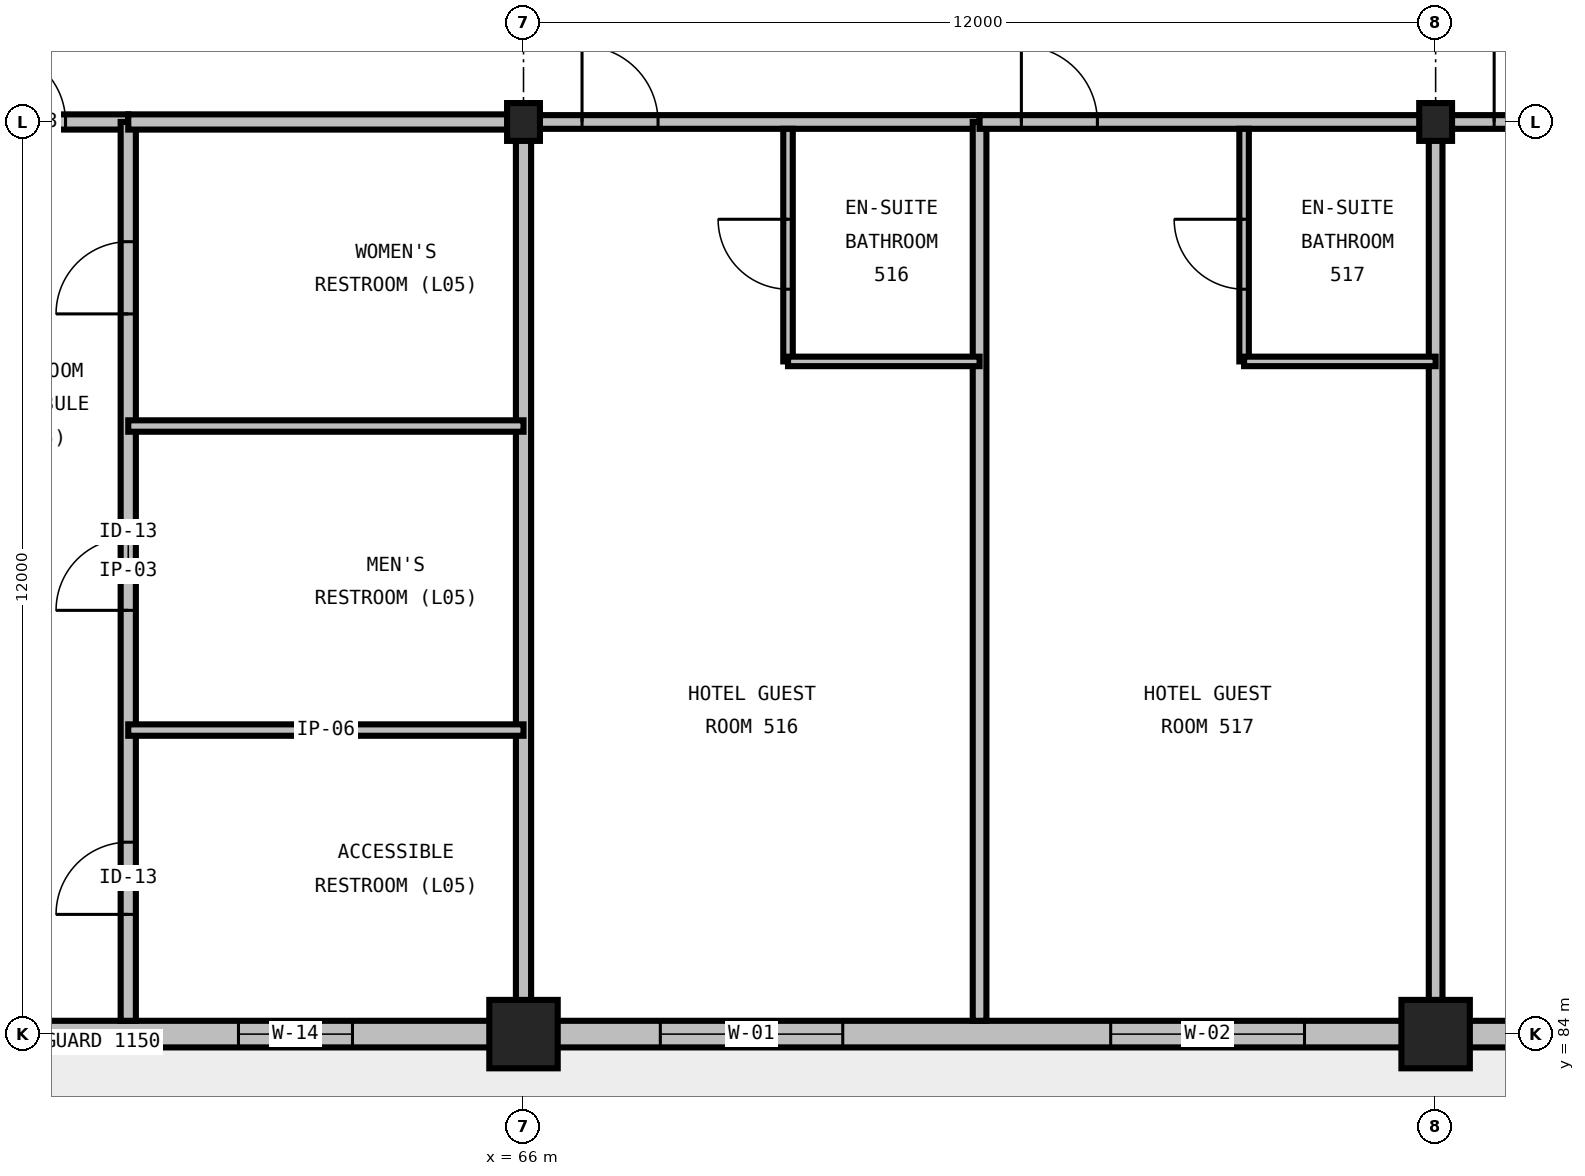
"""IFC4 building model, lengths in metres.
Left out: names, types, materials, properties, quantities, classifications, styles, units other than length and angle.
Written with IfcOpenShell. Run it as: python <this file> out.ifc"""

import sys

from ifc_helpers import new_model, si_unit, direction, frame, frame_2d, origin, origin_2d, place, context, subcontext, project, spatial, rectangle, i_section, extrude, element, fill, save


model = new_model("IFC4")
c1 = context("Model", 3, precision=1e-05, world=origin(), true_north=direction((0.0, 1.0)))
c2 = subcontext(c1, "Body", "Model", "MODEL_VIEW")
j1 = project(units=[si_unit("LENGTHUNIT", "METRE"), si_unit("PLANEANGLEUNIT", "RADIAN")], contexts=[c1])
p1 = place(None, origin())
s1 = spatial("IfcSite", under=j1, at=p1, CompositionType="ELEMENT")
p2 = place(p1, origin())
s2 = spatial("IfcBuilding", under=s1, at=p2, CompositionType="ELEMENT")
p3 = place(p2, frame((0.0, 0.0, 27.6)))
s3 = spatial("IfcBuildingStorey", under=s2, at=p3, CompositionType="ELEMENT", Elevation=27.6)
p4 = place(p3, frame((66.0, 84.0, 0.0), z_axis=(0.0, 0.0, 1.0), x_axis=(1.0, 0.0, 0.0)))
e1 = element("IfcColumn", 1, at=p4, inside=s3, PredefinedType="COLUMN", context=c2, shape_type="SweptSolid", body=[
    extrude(rectangle(XDim=0.9, YDim=0.9, at=origin_2d()), origin(), (0.0, 0.0, 1.0), 3.6),
])
p5 = place(p3, frame((66.0, 96.0, 0.0), z_axis=(0.0, 0.0, 1.0), x_axis=(1.0, 0.0, 0.0)))
e2 = element("IfcColumn", 2, at=p5, inside=s3, PredefinedType="COLUMN", context=c2, shape_type="SweptSolid", body=[
    extrude(i_section(OverallWidth=0.432, OverallDepth=0.498, WebThickness=0.056, FlangeThickness=0.089, FilletRadius=0.031, at=origin_2d()), origin(), (0.0, 0.0, 1.0), 3.6),
])
p6 = place(p3, frame((78.0, 84.0, 0.0), z_axis=(0.0, 0.0, 1.0), x_axis=(1.0, 0.0, 0.0)))
e3 = element("IfcColumn", 3, at=p6, inside=s3, PredefinedType="COLUMN", context=c2, shape_type="SweptSolid", body=[
    extrude(rectangle(XDim=0.9, YDim=0.9, at=origin_2d()), origin(), (0.0, 0.0, 1.0), 3.6),
])
p7 = place(p3, frame((78.0, 96.0, 0.0), z_axis=(0.0, 0.0, 1.0), x_axis=(1.0, 0.0, 0.0)))
e4 = element("IfcColumn", 4, at=p7, inside=s3, PredefinedType="COLUMN", context=c2, shape_type="SweptSolid", body=[
    extrude(i_section(OverallWidth=0.432, OverallDepth=0.498, WebThickness=0.056, FlangeThickness=0.089, FilletRadius=0.031, at=origin_2d()), origin(), (0.0, 0.0, 1.0), 3.6),
])
p8 = place(p3, frame((54.0, 84.0, 0.0), z_axis=(0.0, 0.0, 1.0), x_axis=(1.0, 0.0, 0.0)))
e5 = element("IfcWall", 5, at=p8, inside=s3, PredefinedType="STANDARD", context=c2, shape_type="SweptSolid", body=[
    extrude(rectangle(XDim=12.0, YDim=0.35, at=frame_2d((6.0, 0.0))), origin(), (0.0, 0.0, 1.0), 2.486),
])
p9 = place(p8, frame((2.3, 0.0, 1.0)))
e6 = element("IfcOpeningElement", 6, at=p9, cuts=e5, PredefinedType="OPENING", context=c2, shape_type="SweptSolid", body=[
    extrude(rectangle(XDim=1.4, YDim=1.4, at=frame_2d((0.7, 0.7))), frame((0.0, 0.19, 0.0), z_axis=(0.0, -1.0, 0.0), x_axis=(1.0, 0.0, 0.0)), (0.0, 0.0, 1.0), 0.38),
])
p10 = place(p8, frame((8.25, 0.0, 1.0)))
e7 = element("IfcOpeningElement", 7, at=p10, cuts=e5, PredefinedType="OPENING", context=c2, shape_type="SweptSolid", body=[
    extrude(rectangle(XDim=1.5, YDim=1.35, at=frame_2d((0.75, 0.675))), frame((0.0, 0.19, 0.0), z_axis=(0.0, -1.0, 0.0), x_axis=(1.0, 0.0, 0.0)), (0.0, 0.0, 1.0), 0.38),
])
p11 = place(p3, frame((66.0, 84.0, 0.0), z_axis=(0.0, 0.0, 1.0), x_axis=(1.0, 0.0, 0.0)))
e8 = element("IfcWall", 8, at=p11, inside=s3, PredefinedType="STANDARD", context=c2, shape_type="SweptSolid", body=[
    extrude(rectangle(XDim=12.0, YDim=0.35, at=frame_2d((6.0, 0.0))), origin(), (0.0, 0.0, 1.0), 2.486),
])
p12 = place(p11, frame((1.8, 0.0, 0.75)))
e9 = element("IfcOpeningElement", 9, at=p12, cuts=e8, PredefinedType="OPENING", context=c2, shape_type="SweptSolid", body=[
    extrude(rectangle(XDim=2.4, YDim=1.65, at=frame_2d((1.2, 0.825))), frame((0.0, 0.19, 0.0), z_axis=(0.0, -1.0, 0.0), x_axis=(1.0, 0.0, 0.0)), (0.0, 0.0, 1.0), 0.38),
])
p13 = place(p11, frame((7.725, 0.0, 0.75)))
e10 = element("IfcOpeningElement", 10, at=p13, cuts=e8, PredefinedType="OPENING", context=c2, shape_type="SweptSolid", body=[
    extrude(rectangle(XDim=2.55, YDim=1.65, at=frame_2d((1.275, 0.825))), frame((0.0, 0.19, 0.0), z_axis=(0.0, -1.0, 0.0), x_axis=(1.0, 0.0, 0.0)), (0.0, 0.0, 1.0), 0.38),
])
p14 = place(p3, frame((78.0, 84.0, 0.0), z_axis=(0.0, 0.0, 1.0), x_axis=(1.0, 0.0, 0.0)))
e11 = element("IfcWall", 11, at=p14, inside=s3, PredefinedType="STANDARD", context=c2, shape_type="SweptSolid", body=[
    extrude(rectangle(XDim=6.0, YDim=0.35, at=frame_2d((3.0, 0.0))), origin(), (0.0, 0.0, 1.0), 2.486),
])
p15 = place(p14, frame((1.8, 0.0, 0.75)))
e12 = element("IfcOpeningElement", 12, at=p15, cuts=e11, PredefinedType="OPENING", context=c2, shape_type="SweptSolid", body=[
    extrude(rectangle(XDim=2.4, YDim=1.65, at=frame_2d((1.2, 0.825))), frame((0.0, 0.19, 0.0), z_axis=(0.0, -1.0, 0.0), x_axis=(1.0, 0.0, 0.0)), (0.0, 0.0, 1.0), 0.38),
])
p16 = place(p3, frame((58.4, 96.0, 0.0), z_axis=(0.0, 0.0, 1.0), x_axis=(1.0, 0.0, 0.0)))
e13 = element("IfcWall", 13, at=p16, inside=s3, PredefinedType="PARTITIONING", context=c2, shape_type="SweptSolid", body=[
    extrude(rectangle(XDim=2.4, YDim=0.2, at=frame_2d((1.2, 0.0))), origin(), (0.0, 0.0, 1.0), 2.359),
])
p17 = place(p16, frame((0.625, 0.0, 0.0)))
e14 = element("IfcOpeningElement", 14, at=p17, cuts=e13, PredefinedType="OPENING", context=c2, shape_type="SweptSolid", body=[
    extrude(rectangle(XDim=0.95, YDim=2.15, at=frame_2d((0.475, 1.075))), frame((0.0, 0.115, 0.0), z_axis=(0.0, -1.0, 0.0), x_axis=(1.0, 0.0, 0.0)), (0.0, 0.0, 1.0), 0.23),
])
p18 = place(p3, frame((60.8, 84.175, 0.0), z_axis=(0.0, 0.0, 1.0), x_axis=(0.0, 1.0, 0.0)))
e15 = element("IfcWall", 15, at=p18, inside=s3, PredefinedType="PARTITIONING", context=c2, shape_type="SweptSolid", body=[
    extrude(rectangle(XDim=11.825, YDim=0.2, at=frame_2d((5.913, 0.0))), origin(), (0.0, 0.0, 1.0), 3.29),
])
p19 = place(p18, frame((1.4, 0.0, 0.0)))
e16 = element("IfcOpeningElement", 16, at=p19, cuts=e15, PredefinedType="OPENING", context=c2, shape_type="SweptSolid", body=[
    extrude(rectangle(XDim=0.95, YDim=2.15, at=frame_2d((0.475, 1.075))), frame((0.0, 0.115, 0.0), z_axis=(0.0, -1.0, 0.0), x_axis=(1.0, 0.0, 0.0)), (0.0, 0.0, 1.0), 0.23),
])
p20 = place(p18, frame((5.4, 0.0, 0.0)))
e17 = element("IfcOpeningElement", 17, at=p20, cuts=e15, PredefinedType="OPENING", context=c2, shape_type="SweptSolid", body=[
    extrude(rectangle(XDim=0.95, YDim=2.15, at=frame_2d((0.475, 1.075))), frame((0.0, 0.115, 0.0), z_axis=(0.0, -1.0, 0.0), x_axis=(1.0, 0.0, 0.0)), (0.0, 0.0, 1.0), 0.23),
])
p21 = place(p18, frame((9.3, 0.0, 0.0)))
e18 = element("IfcOpeningElement", 18, at=p21, cuts=e15, PredefinedType="OPENING", context=c2, shape_type="SweptSolid", body=[
    extrude(rectangle(XDim=0.95, YDim=2.15, at=frame_2d((0.475, 1.075))), frame((0.0, 0.115, 0.0), z_axis=(0.0, -1.0, 0.0), x_axis=(1.0, 0.0, 0.0)), (0.0, 0.0, 1.0), 0.23),
])
p22 = place(p3, frame((66.0, 84.175, 0.0), z_axis=(0.0, 0.0, 1.0), x_axis=(0.0, 1.0, 0.0)))
e19 = element("IfcWall", 19, at=p22, inside=s3, PredefinedType="PARTITIONING", context=c2, shape_type="SweptSolid", body=[
    extrude(rectangle(XDim=11.825, YDim=0.2, at=frame_2d((5.913, 0.0))), origin(), (0.0, 0.0, 1.0), 2.59),
])
p23 = place(p3, frame((60.8, 96.0, 0.0), z_axis=(0.0, 0.0, 1.0), x_axis=(1.0, 0.0, 0.0)))
e20 = element("IfcWall", 20, at=p23, inside=s3, PredefinedType="PARTITIONING", context=c2, shape_type="SweptSolid", body=[
    extrude(rectangle(XDim=5.2, YDim=0.2, at=frame_2d((2.6, 0.0))), origin(), (0.0, 0.0, 1.0), 2.359),
])
for number, where, z_axis, x_axis in (
    (21, (60.8, 88.0, 0.0), (0.0, 0.0, 1.0), (1.0, 0.0, 0.0)),
    (22, (60.8, 92.0, 0.0), (0.0, 0.0, 1.0), (1.0, 0.0, 0.0)),
):
    element("IfcWall", number, at=place(p3, frame(where, z_axis=z_axis, x_axis=x_axis)), inside=s3, PredefinedType="PARTITIONING", context=c2, shape_type="SweptSolid", body=[
        extrude(rectangle(XDim=5.2, YDim=0.15, at=frame_2d((2.6, 0.0))), origin(), (0.0, 0.0, 1.0), 3.29),
    ])
p24 = place(p3, frame((66.0, 96.0, 0.0), z_axis=(0.0, 0.0, 1.0), x_axis=(1.0, 0.0, 0.0)))
e23 = element("IfcWall", 23, at=p24, inside=s3, PredefinedType="PARTITIONING", context=c2, shape_type="SweptSolid", body=[
    extrude(rectangle(XDim=6.0, YDim=0.18, at=frame_2d((3.0, 0.0))), origin(), (0.0, 0.0, 1.0), 2.664),
])
p25 = place(p24, frame((0.77, 0.0, 0.0)))
e24 = element("IfcOpeningElement", 24, at=p25, cuts=e23, PredefinedType="OPENING", context=c2, shape_type="SweptSolid", body=[
    extrude(rectangle(XDim=1.0, YDim=2.15, at=frame_2d((0.5, 1.075))), frame((0.0, 0.105, 0.0), z_axis=(0.0, -1.0, 0.0), x_axis=(1.0, 0.0, 0.0)), (0.0, 0.0, 1.0), 0.21),
])
p26 = place(p3, frame((72.0, 84.175, 0.0), z_axis=(0.0, 0.0, 1.0), x_axis=(0.0, 1.0, 0.0)))
e25 = element("IfcWall", 25, at=p26, inside=s3, PredefinedType="PARTITIONING", context=c2, shape_type="SweptSolid", body=[
    extrude(rectangle(XDim=11.825, YDim=0.18, at=frame_2d((5.913, 0.0))), origin(), (0.0, 0.0, 1.0), 3.29),
])
p27 = place(p3, frame((69.48, 92.85, 0.0), z_axis=(0.0, 0.0, 1.0), x_axis=(0.0, 1.0, 0.0)))
e26 = element("IfcWall", 26, at=p27, inside=s3, PredefinedType="PARTITIONING", context=c2, shape_type="SweptSolid", body=[
    extrude(rectangle(XDim=3.06, YDim=0.125, at=frame_2d((1.53, 0.0))), origin(), (0.0, 0.0, 1.0), 3.29),
])
p28 = place(p27, frame((0.95, 0.0, 0.0)))
e27 = element("IfcOpeningElement", 27, at=p28, cuts=e26, PredefinedType="OPENING", context=c2, shape_type="SweptSolid", body=[
    extrude(rectangle(XDim=0.92, YDim=2.1, at=frame_2d((0.46, 1.05))), frame((0.0, 0.077, 0.0), z_axis=(0.0, -1.0, 0.0), x_axis=(1.0, 0.0, 0.0)), (0.0, 0.0, 1.0), 0.155),
])
p29 = place(p3, frame((69.48, 92.85, 0.0), z_axis=(0.0, 0.0, 1.0), x_axis=(1.0, 0.0, 0.0)))
e28 = element("IfcWall", 28, at=p29, inside=s3, PredefinedType="PARTITIONING", context=c2, shape_type="SweptSolid", body=[
    extrude(rectangle(XDim=2.52, YDim=0.125, at=frame_2d((1.26, 0.0))), origin(), (0.0, 0.0, 1.0), 3.29),
])
p30 = place(p3, frame((72.0, 96.0, 0.0), z_axis=(0.0, 0.0, 1.0), x_axis=(1.0, 0.0, 0.0)))
e29 = element("IfcWall", 29, at=p30, inside=s3, PredefinedType="PARTITIONING", context=c2, shape_type="SweptSolid", body=[
    extrude(rectangle(XDim=6.0, YDim=0.18, at=frame_2d((3.0, 0.0))), origin(), (0.0, 0.0, 1.0), 2.664),
])
p31 = place(p30, frame((0.55, 0.0, 0.0)))
e30 = element("IfcOpeningElement", 30, at=p31, cuts=e29, PredefinedType="OPENING", context=c2, shape_type="SweptSolid", body=[
    extrude(rectangle(XDim=1.0, YDim=2.15, at=frame_2d((0.5, 1.075))), frame((0.0, 0.105, 0.0), z_axis=(0.0, -1.0, 0.0), x_axis=(1.0, 0.0, 0.0)), (0.0, 0.0, 1.0), 0.21),
])
p32 = place(p3, frame((78.0, 84.175, 0.0), z_axis=(0.0, 0.0, 1.0), x_axis=(0.0, 1.0, 0.0)))
e31 = element("IfcWall", 31, at=p32, inside=s3, PredefinedType="PARTITIONING", context=c2, shape_type="SweptSolid", body=[
    extrude(rectangle(XDim=11.825, YDim=0.18, at=frame_2d((5.913, 0.0))), origin(), (0.0, 0.0, 1.0), 2.59),
])
p33 = place(p3, frame((75.48, 92.85, 0.0), z_axis=(0.0, 0.0, 1.0), x_axis=(0.0, 1.0, 0.0)))
e32 = element("IfcWall", 32, at=p33, inside=s3, PredefinedType="PARTITIONING", context=c2, shape_type="SweptSolid", body=[
    extrude(rectangle(XDim=3.06, YDim=0.125, at=frame_2d((1.53, 0.0))), origin(), (0.0, 0.0, 1.0), 3.29),
])
p34 = place(p33, frame((0.95, 0.0, 0.0)))
e33 = element("IfcOpeningElement", 33, at=p34, cuts=e32, PredefinedType="OPENING", context=c2, shape_type="SweptSolid", body=[
    extrude(rectangle(XDim=0.92, YDim=2.1, at=frame_2d((0.46, 1.05))), frame((0.0, 0.077, 0.0), z_axis=(0.0, -1.0, 0.0), x_axis=(1.0, 0.0, 0.0)), (0.0, 0.0, 1.0), 0.155),
])
p35 = place(p3, frame((75.48, 92.85, 0.0), z_axis=(0.0, 0.0, 1.0), x_axis=(1.0, 0.0, 0.0)))
e34 = element("IfcWall", 34, at=p35, inside=s3, PredefinedType="PARTITIONING", context=c2, shape_type="SweptSolid", body=[
    extrude(rectangle(XDim=2.52, YDim=0.125, at=frame_2d((1.26, 0.0))), origin(), (0.0, 0.0, 1.0), 3.29),
])
p36 = place(p3, frame((78.0, 96.0, 0.0), z_axis=(0.0, 0.0, 1.0), x_axis=(1.0, 0.0, 0.0)))
e35 = element("IfcWall", 35, at=p36, inside=s3, PredefinedType="PARTITIONING", context=c2, shape_type="SweptSolid", body=[
    extrude(rectangle(XDim=6.0, YDim=0.18, at=frame_2d((3.0, 0.0))), origin(), (0.0, 0.0, 1.0), 2.736),
])
p37 = place(p36, frame((0.77, 0.0, 0.0)))
e36 = element("IfcOpeningElement", 36, at=p37, cuts=e35, PredefinedType="OPENING", context=c2, shape_type="SweptSolid", body=[
    extrude(rectangle(XDim=1.0, YDim=2.15, at=frame_2d((0.5, 1.075))), frame((0.0, 0.105, 0.0), z_axis=(0.0, -1.0, 0.0), x_axis=(1.0, 0.0, 0.0)), (0.0, 0.0, 1.0), 0.21),
])
p38 = place(p10, origin())
e37 = element("IfcWindow", 37, at=p38, inside=s3, PartitioningType="SINGLE_PANEL", PredefinedType="WINDOW", context=c2, shape_type="SweptSolid", body=[
    extrude(rectangle(XDim=1.5, YDim=1.35, at=frame_2d((0.75, 0.675))), frame((0.0, 0.03, 0.0), z_axis=(0.0, -1.0, 0.0), x_axis=(1.0, 0.0, 0.0)), (0.0, 0.0, 1.0), 0.06),
])
fill(e7, e37)
p39 = place(p12, origin())
e38 = element("IfcWindow", 38, at=p39, inside=s3, PartitioningType="DOUBLE_PANEL_VERTICAL", PredefinedType="WINDOW", context=c2, shape_type="SweptSolid", body=[
    extrude(rectangle(XDim=2.4, YDim=1.65, at=frame_2d((1.2, 0.825))), frame((0.0, 0.03, 0.0), z_axis=(0.0, -1.0, 0.0), x_axis=(1.0, 0.0, 0.0)), (0.0, 0.0, 1.0), 0.06),
])
fill(e9, e38)
p40 = place(p13, origin())
e39 = element("IfcWindow", 39, at=p40, inside=s3, PartitioningType="DOUBLE_PANEL_VERTICAL", PredefinedType="WINDOW", context=c2, shape_type="SweptSolid", body=[
    extrude(rectangle(XDim=2.55, YDim=1.65, at=frame_2d((1.275, 0.825))), frame((0.0, 0.03, 0.0), z_axis=(0.0, -1.0, 0.0), x_axis=(1.0, 0.0, 0.0)), (0.0, 0.0, 1.0), 0.06),
])
fill(e10, e39)
p41 = place(p17, origin())
e40 = element("IfcDoor", 40, at=p41, inside=s3, OperationType="SINGLE_SWING_LEFT", PredefinedType="DOOR", context=c2, shape_type="SweptSolid", body=[
    extrude(rectangle(XDim=0.95, YDim=2.15, at=frame_2d((0.475, 1.075))), frame((0.0, 0.025, 0.0), z_axis=(0.0, -1.0, 0.0), x_axis=(1.0, 0.0, 0.0)), (0.0, 0.0, 1.0), 0.05),
])
fill(e14, e40)
p42 = place(p19, origin())
e41 = element("IfcDoor", 41, at=p42, inside=s3, OperationType="SINGLE_SWING_LEFT", PredefinedType="DOOR", context=c2, shape_type="SweptSolid", body=[
    extrude(rectangle(XDim=0.95, YDim=2.15, at=frame_2d((0.475, 1.075))), frame((0.0, 0.025, 0.0), z_axis=(0.0, -1.0, 0.0), x_axis=(1.0, 0.0, 0.0)), (0.0, 0.0, 1.0), 0.05),
])
fill(e16, e41)
p43 = place(p20, origin())
e42 = element("IfcDoor", 42, at=p43, inside=s3, OperationType="SINGLE_SWING_LEFT", PredefinedType="DOOR", context=c2, shape_type="SweptSolid", body=[
    extrude(rectangle(XDim=0.95, YDim=2.15, at=frame_2d((0.475, 1.075))), frame((0.0, 0.025, 0.0), z_axis=(0.0, -1.0, 0.0), x_axis=(1.0, 0.0, 0.0)), (0.0, 0.0, 1.0), 0.05),
])
fill(e17, e42)
p44 = place(p21, origin())
e43 = element("IfcDoor", 43, at=p44, inside=s3, OperationType="SINGLE_SWING_LEFT", PredefinedType="DOOR", context=c2, shape_type="SweptSolid", body=[
    extrude(rectangle(XDim=0.95, YDim=2.15, at=frame_2d((0.475, 1.075))), frame((0.0, 0.025, 0.0), z_axis=(0.0, -1.0, 0.0), x_axis=(1.0, 0.0, 0.0)), (0.0, 0.0, 1.0), 0.05),
])
fill(e18, e43)
p45 = place(p25, origin())
e44 = element("IfcDoor", 44, at=p45, inside=s3, OperationType="SINGLE_SWING_LEFT", PredefinedType="DOOR", context=c2, shape_type="SweptSolid", body=[
    extrude(rectangle(XDim=1.0, YDim=2.15, at=frame_2d((0.5, 1.075))), frame((0.0, 0.025, 0.0), z_axis=(0.0, -1.0, 0.0), x_axis=(1.0, 0.0, 0.0)), (0.0, 0.0, 1.0), 0.05),
])
fill(e24, e44)
p46 = place(p28, origin())
e45 = element("IfcDoor", 45, at=p46, inside=s3, OperationType="SINGLE_SWING_RIGHT", PredefinedType="DOOR", context=c2, shape_type="SweptSolid", body=[
    extrude(rectangle(XDim=0.92, YDim=2.1, at=frame_2d((0.46, 1.05))), frame((0.0, 0.025, 0.0), z_axis=(0.0, -1.0, 0.0), x_axis=(1.0, 0.0, 0.0)), (0.0, 0.0, 1.0), 0.05),
])
fill(e27, e45)
p47 = place(p31, origin())
e46 = element("IfcDoor", 46, at=p47, inside=s3, OperationType="SINGLE_SWING_LEFT", PredefinedType="DOOR", context=c2, shape_type="SweptSolid", body=[
    extrude(rectangle(XDim=1.0, YDim=2.15, at=frame_2d((0.5, 1.075))), frame((0.0, 0.025, 0.0), z_axis=(0.0, -1.0, 0.0), x_axis=(1.0, 0.0, 0.0)), (0.0, 0.0, 1.0), 0.05),
])
fill(e30, e46)
p48 = place(p34, origin())
e47 = element("IfcDoor", 47, at=p48, inside=s3, OperationType="SINGLE_SWING_RIGHT", PredefinedType="DOOR", context=c2, shape_type="SweptSolid", body=[
    extrude(rectangle(XDim=0.92, YDim=2.1, at=frame_2d((0.46, 1.05))), frame((0.0, 0.025, 0.0), z_axis=(0.0, -1.0, 0.0), x_axis=(1.0, 0.0, 0.0)), (0.0, 0.0, 1.0), 0.05),
])
fill(e33, e47)
p49 = place(p37, origin())
e48 = element("IfcDoor", 48, at=p49, inside=s3, OperationType="SINGLE_SWING_LEFT", PredefinedType="DOOR", context=c2, shape_type="SweptSolid", body=[
    extrude(rectangle(XDim=1.0, YDim=2.15, at=frame_2d((0.5, 1.075))), frame((0.0, 0.025, 0.0), z_axis=(0.0, -1.0, 0.0), x_axis=(1.0, 0.0, 0.0)), (0.0, 0.0, 1.0), 0.05),
])
fill(e36, e48)
save(model, sys.argv[1])
